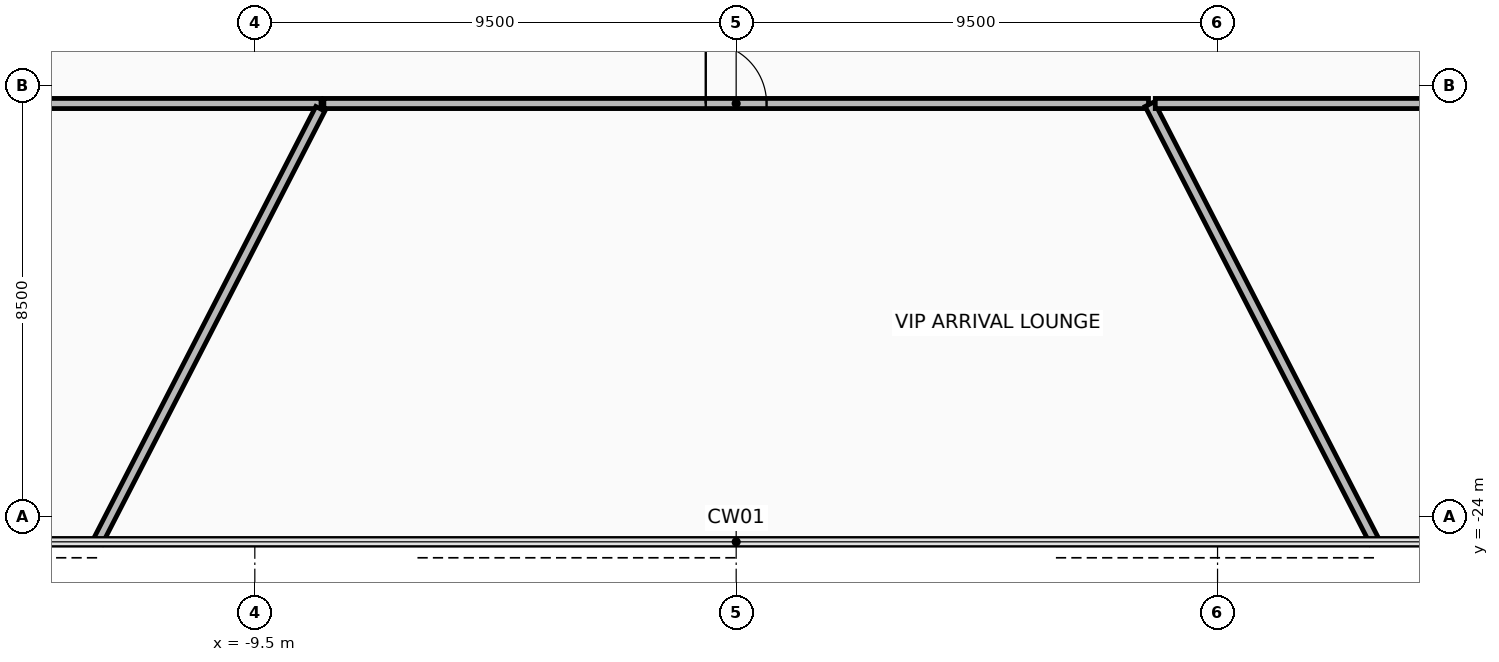
"""IFC4 building model, lengths in metres.
Left out: names, types, materials, properties, quantities, classifications, styles, units other than length and angle.
Written with IfcOpenShell. Run it as: python <this file> out.ifc"""

import sys

from ifc_helpers import new_model, si_unit, direction, frame, frame_2d, origin, place, context, subcontext, project, spatial, rectangle, extrude, element, fill, save


model = new_model("IFC4")
c1 = context("Model", 3, precision=1e-05, world=origin(), true_north=direction((0.0, 1.0)))
c2 = subcontext(c1, "Body", "Model", "MODEL_VIEW")
j1 = project(units=[si_unit("LENGTHUNIT", "METRE"), si_unit("PLANEANGLEUNIT", "RADIAN")], contexts=[c1])
p1 = place(None, origin())
s1 = spatial("IfcSite", under=j1, at=p1, CompositionType="ELEMENT")
p2 = place(p1, origin())
s2 = spatial("IfcBuilding", under=s1, at=p2, CompositionType="ELEMENT")
p3 = place(p2, frame((0.0, 0.0, 5.5)))
s3 = spatial("IfcBuildingStorey", under=s2, at=p3, CompositionType="ELEMENT", Elevation=5.5)
p4 = place(p3, frame((-17.525, -15.85, 0.0), z_axis=(0.0, 0.0, 1.0), x_axis=(1.0, 0.0, 0.0)))
e1 = element("IfcWall", 1, at=p4, inside=s3, PredefinedType="PARTITIONING", context=c2, shape_type="SweptSolid", body=[
    extrude(rectangle(XDim=9.331, YDim=0.2, at=frame_2d((4.666, 0.0))), origin(), (0.0, 0.0, 1.0), 4.565),
])
p5 = place(p3, frame((-8.207, -15.955, 0.0), z_axis=(0.0, 0.0, 1.0), x_axis=(-0.457408290436, -0.889256799715, 0.0)))
e2 = element("IfcWall", 2, at=p5, inside=s3, PredefinedType="PARTITIONING", context=c2, shape_type="SweptSolid", body=[
    extrude(rectangle(XDim=9.609, YDim=0.2, at=frame_2d((4.805, 0.0))), origin(), (0.0, 0.0, 1.0), 4.565),
])
p6 = place(p3, frame((-8.137, -15.85, 0.0), z_axis=(0.0, 0.0, 1.0), x_axis=(1.0, 0.0, 0.0)))
e3 = element("IfcWall", 3, at=p6, inside=s3, PredefinedType="PARTITIONING", context=c2, shape_type="SweptSolid", body=[
    extrude(rectangle(XDim=16.275, YDim=0.2, at=frame_2d((8.137, 0.0))), origin(), (0.0, 0.0, 1.0), 4.565),
])
p7 = place(p6, frame((7.537, 0.0, 0.0)))
e4 = element("IfcOpeningElement", 4, at=p7, cuts=e3, PredefinedType="OPENING", context=c2, shape_type="SweptSolid", body=[
    extrude(rectangle(XDim=1.2, YDim=2.15, at=frame_2d((0.6, 1.075))), frame((0.0, 0.11, 0.0), z_axis=(0.0, -1.0, 0.0), x_axis=(1.0, 0.0, 0.0)), (0.0, 0.0, 1.0), 0.22),
])
p8 = place(p3, frame((8.16, -15.864, 0.0), z_axis=(0.0, 0.0, 1.0), x_axis=(0.457390612437, -0.889265892551, 0.0)))
e5 = element("IfcWall", 5, at=p8, inside=s3, PredefinedType="PARTITIONING", context=c2, shape_type="SweptSolid", body=[
    extrude(rectangle(XDim=9.712, YDim=0.2, at=frame_2d((4.856, 0.0))), origin(), (0.0, 0.0, 1.0), 4.565),
])
p9 = place(p3, frame((8.271, -15.85, 0.0), z_axis=(0.0, 0.0, 1.0), x_axis=(1.0, 0.0, 0.0)))
e6 = element("IfcWall", 6, at=p9, inside=s3, PredefinedType="PARTITIONING", context=c2, shape_type="SweptSolid", body=[
    extrude(rectangle(XDim=9.278, YDim=0.2, at=frame_2d((4.639, 0.0))), origin(), (0.0, 0.0, 1.0), 4.565),
])
p10 = place(p7, origin())
e7 = element("IfcDoor", 7, at=p10, inside=s3, OperationType="SINGLE_SWING_LEFT", PredefinedType="DOOR", context=c2, shape_type="SweptSolid", body=[
    extrude(rectangle(XDim=1.2, YDim=2.15, at=frame_2d((0.6, 1.075))), frame((0.0, 0.025, 0.0), z_axis=(0.0, -1.0, 0.0), x_axis=(1.0, 0.0, 0.0)), (0.0, 0.0, 1.0), 0.05),
])
fill(e4, e7)
save(model, sys.argv[1])
